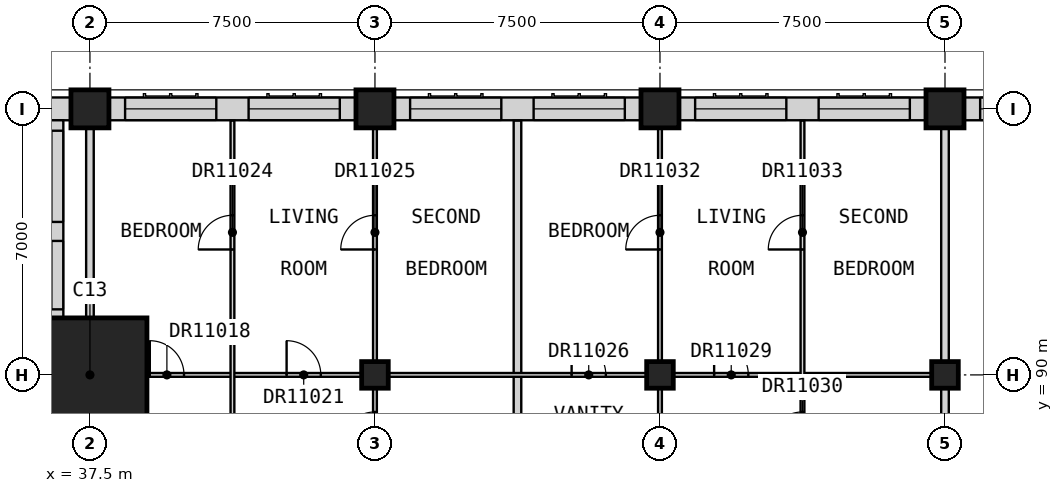
"""IFC4 building model, lengths in metres.
Left out: names, types, materials, properties, quantities, classifications, styles, units other than length and angle.
Written with IfcOpenShell. Run it as: python <this file> out.ifc"""

import sys

from ifc_helpers import new_model, si_unit, direction, frame, frame_2d, origin, origin_2d, place, context, subcontext, project, spatial, rectangle, extrude, element, fill, save


model = new_model("IFC4")
c1 = context("Model", 3, precision=1e-05, world=origin(), true_north=direction((0.0, 1.0)))
c2 = subcontext(c1, "Body", "Model", "MODEL_VIEW")
j1 = project(units=[si_unit("LENGTHUNIT", "METRE"), si_unit("PLANEANGLEUNIT", "RADIAN")], contexts=[c1])
p1 = place(None, origin())
s1 = spatial("IfcSite", under=j1, at=p1, CompositionType="ELEMENT")
p2 = place(p1, origin())
s2 = spatial("IfcBuilding", under=s1, at=p2, CompositionType="ELEMENT")
p3 = place(p2, frame((0.0, 0.0, 276.7)))
s3 = spatial("IfcBuildingStorey", under=s2, at=p3, CompositionType="ELEMENT", Elevation=276.7)
p4 = place(p3, frame((37.5, 97.0, 0.0), z_axis=(0.0, 0.0, 1.0), x_axis=(1.0, 0.0, 0.0)))
e1 = element("IfcColumn", 1, at=p4, inside=s3, PredefinedType="COLUMN", context=c2, shape_type="SweptSolid", body=[
    extrude(rectangle(XDim=1.0, YDim=1.0, at=origin_2d()), origin(), (0.0, 0.0, 1.0), 3.5),
])
p5 = place(p3, frame((45.0, 90.0, 0.0), z_axis=(0.0, 0.0, 1.0), x_axis=(1.0, 0.0, 0.0)))
e2 = element("IfcColumn", 2, at=p5, inside=s3, PredefinedType="COLUMN", context=c2, shape_type="SweptSolid", body=[
    extrude(rectangle(XDim=0.7, YDim=0.7, at=origin_2d()), origin(), (0.0, 0.0, 1.0), 3.5),
])
p6 = place(p3, frame((45.0, 97.0, 0.0), z_axis=(0.0, 0.0, 1.0), x_axis=(1.0, 0.0, 0.0)))
e3 = element("IfcColumn", 3, at=p6, inside=s3, PredefinedType="COLUMN", context=c2, shape_type="SweptSolid", body=[
    extrude(rectangle(XDim=1.0, YDim=1.0, at=origin_2d()), origin(), (0.0, 0.0, 1.0), 3.5),
])
p7 = place(p3, frame((52.5, 90.0, 0.0), z_axis=(0.0, 0.0, 1.0), x_axis=(1.0, 0.0, 0.0)))
e4 = element("IfcColumn", 4, at=p7, inside=s3, PredefinedType="COLUMN", context=c2, shape_type="SweptSolid", body=[
    extrude(rectangle(XDim=0.7, YDim=0.7, at=origin_2d()), origin(), (0.0, 0.0, 1.0), 3.5),
])
p8 = place(p3, frame((52.5, 97.0, 0.0), z_axis=(0.0, 0.0, 1.0), x_axis=(1.0, 0.0, 0.0)))
e5 = element("IfcColumn", 5, at=p8, inside=s3, PredefinedType="COLUMN", context=c2, shape_type="SweptSolid", body=[
    extrude(rectangle(XDim=1.0, YDim=1.0, at=origin_2d()), origin(), (0.0, 0.0, 1.0), 3.5),
])
p9 = place(p3, frame((60.0, 90.0, 0.0), z_axis=(0.0, 0.0, 1.0), x_axis=(1.0, 0.0, 0.0)))
e6 = element("IfcColumn", 6, at=p9, inside=s3, PredefinedType="COLUMN", context=c2, shape_type="SweptSolid", body=[
    extrude(rectangle(XDim=0.7, YDim=0.7, at=origin_2d()), origin(), (0.0, 0.0, 1.0), 3.5),
])
p10 = place(p3, frame((60.0, 97.0, 0.0), z_axis=(0.0, 0.0, 1.0), x_axis=(1.0, 0.0, 0.0)))
e7 = element("IfcColumn", 7, at=p10, inside=s3, PredefinedType="COLUMN", context=c2, shape_type="SweptSolid", body=[
    extrude(rectangle(XDim=1.0, YDim=1.0, at=origin_2d()), origin(), (0.0, 0.0, 1.0), 3.5),
])
p11 = place(p3, frame((37.5, 90.0, 0.0), z_axis=(0.0, 0.0, 1.0), x_axis=(1.0, 0.0, 0.0)))
e8 = element("IfcColumn", 8, at=p11, inside=s3, PredefinedType="COLUMN", context=c2, shape_type="SweptSolid", body=[
    extrude(rectangle(XDim=3.0, YDim=3.0, at=origin_2d()), origin(), (0.0, 0.0, 1.0), 3.5),
])
p12 = place(p3, frame((67.0, 97.0, 0.0), z_axis=(0.0, 0.0, 1.0), x_axis=(-1.0, 0.0, 0.0)))
e9 = element("IfcWall", 9, at=p12, inside=s3, PredefinedType="SOLIDWALL", context=c2, shape_type="SweptSolid", body=[
    extrude(rectangle(XDim=6.5, YDim=0.6, at=frame_2d((3.25, 0.0))), origin(), (0.0, 0.0, 1.0), 2.75),
])
p13 = place(p12, frame((3.675, 0.0, 0.8)))
e10 = element("IfcOpeningElement", 10, at=p13, cuts=e9, PredefinedType="OPENING", context=c2, shape_type="SweptSolid", body=[
    extrude(rectangle(XDim=2.4, YDim=1.8, at=frame_2d((1.2, 0.9))), frame((0.0, 0.31, 0.0), z_axis=(0.0, -1.0, 0.0), x_axis=(1.0, 0.0, 0.0)), (0.0, 0.0, 1.0), 0.62),
])
p14 = place(p12, frame((0.425, 0.0, 0.8)))
e11 = element("IfcOpeningElement", 11, at=p14, cuts=e9, PredefinedType="OPENING", context=c2, shape_type="SweptSolid", body=[
    extrude(rectangle(XDim=2.4, YDim=1.8, at=frame_2d((1.2, 0.9))), frame((0.0, 0.31, 0.0), z_axis=(0.0, -1.0, 0.0), x_axis=(1.0, 0.0, 0.0)), (0.0, 0.0, 1.0), 0.62),
])
p15 = place(p3, frame((59.5, 97.0, 0.0), z_axis=(0.0, 0.0, 1.0), x_axis=(-1.0, 0.0, 0.0)))
e12 = element("IfcWall", 12, at=p15, inside=s3, PredefinedType="SOLIDWALL", context=c2, shape_type="SweptSolid", body=[
    extrude(rectangle(XDim=6.5, YDim=0.6, at=frame_2d((3.25, 0.0))), origin(), (0.0, 0.0, 1.0), 2.75),
])
p16 = place(p15, frame((3.675, 0.0, 0.8)))
e13 = element("IfcOpeningElement", 13, at=p16, cuts=e12, PredefinedType="OPENING", context=c2, shape_type="SweptSolid", body=[
    extrude(rectangle(XDim=2.4, YDim=1.8, at=frame_2d((1.2, 0.9))), frame((0.0, 0.31, 0.0), z_axis=(0.0, -1.0, 0.0), x_axis=(1.0, 0.0, 0.0)), (0.0, 0.0, 1.0), 0.62),
])
p17 = place(p15, frame((0.425, 0.0, 0.8)))
e14 = element("IfcOpeningElement", 14, at=p17, cuts=e12, PredefinedType="OPENING", context=c2, shape_type="SweptSolid", body=[
    extrude(rectangle(XDim=2.4, YDim=1.8, at=frame_2d((1.2, 0.9))), frame((0.0, 0.31, 0.0), z_axis=(0.0, -1.0, 0.0), x_axis=(1.0, 0.0, 0.0)), (0.0, 0.0, 1.0), 0.62),
])
p18 = place(p3, frame((52.0, 97.0, 0.0), z_axis=(0.0, 0.0, 1.0), x_axis=(-1.0, 0.0, 0.0)))
e15 = element("IfcWall", 15, at=p18, inside=s3, PredefinedType="SOLIDWALL", context=c2, shape_type="SweptSolid", body=[
    extrude(rectangle(XDim=6.5, YDim=0.6, at=frame_2d((3.25, 0.0))), origin(), (0.0, 0.0, 1.0), 2.75),
])
p19 = place(p18, frame((3.675, 0.0, 0.8)))
e16 = element("IfcOpeningElement", 16, at=p19, cuts=e15, PredefinedType="OPENING", context=c2, shape_type="SweptSolid", body=[
    extrude(rectangle(XDim=2.4, YDim=1.8, at=frame_2d((1.2, 0.9))), frame((0.0, 0.31, 0.0), z_axis=(0.0, -1.0, 0.0), x_axis=(1.0, 0.0, 0.0)), (0.0, 0.0, 1.0), 0.62),
])
p20 = place(p18, frame((0.425, 0.0, 0.8)))
e17 = element("IfcOpeningElement", 17, at=p20, cuts=e15, PredefinedType="OPENING", context=c2, shape_type="SweptSolid", body=[
    extrude(rectangle(XDim=2.4, YDim=1.8, at=frame_2d((1.2, 0.9))), frame((0.0, 0.31, 0.0), z_axis=(0.0, -1.0, 0.0), x_axis=(1.0, 0.0, 0.0)), (0.0, 0.0, 1.0), 0.62),
])
p21 = place(p3, frame((44.5, 97.0, 0.0), z_axis=(0.0, 0.0, 1.0), x_axis=(-1.0, 0.0, 0.0)))
e18 = element("IfcWall", 18, at=p21, inside=s3, PredefinedType="SOLIDWALL", context=c2, shape_type="SweptSolid", body=[
    extrude(rectangle(XDim=6.5, YDim=0.6, at=frame_2d((3.25, 0.0))), origin(), (0.0, 0.0, 1.0), 2.75),
])
p22 = place(p21, frame((3.675, 0.0, 0.8)))
e19 = element("IfcOpeningElement", 19, at=p22, cuts=e18, PredefinedType="OPENING", context=c2, shape_type="SweptSolid", body=[
    extrude(rectangle(XDim=2.4, YDim=1.8, at=frame_2d((1.2, 0.9))), frame((0.0, 0.31, 0.0), z_axis=(0.0, -1.0, 0.0), x_axis=(1.0, 0.0, 0.0)), (0.0, 0.0, 1.0), 0.62),
])
p23 = place(p21, frame((0.425, 0.0, 0.8)))
e20 = element("IfcOpeningElement", 20, at=p23, cuts=e18, PredefinedType="OPENING", context=c2, shape_type="SweptSolid", body=[
    extrude(rectangle(XDim=2.4, YDim=1.8, at=frame_2d((1.2, 0.9))), frame((0.0, 0.31, 0.0), z_axis=(0.0, -1.0, 0.0), x_axis=(1.0, 0.0, 0.0)), (0.0, 0.0, 1.0), 0.62),
])
p24 = place(p3, frame((37.0, 97.0, 0.0), z_axis=(0.0, 0.0, 1.0), x_axis=(-1.0, 0.0, 0.0)))
e21 = element("IfcWall", 21, at=p24, inside=s3, PredefinedType="SOLIDWALL", context=c2, shape_type="SweptSolid", body=[
    extrude(rectangle(XDim=1.0, YDim=0.6, at=frame_2d((0.5, 0.0))), origin(), (0.0, 0.0, 1.0), 3.25),
])
p25 = place(p3, frame((36.5, 96.7, 0.0), z_axis=(0.0, 0.0, 1.0), x_axis=(0.0, -1.0, 0.0)))
e22 = element("IfcWall", 22, at=p25, inside=s3, PredefinedType="SOLIDWALL", context=c2, shape_type="SweptSolid", body=[
    extrude(rectangle(XDim=5.2, YDim=0.6, at=frame_2d((2.6, 0.0))), origin(), (0.0, 0.0, 1.0), 3.25),
])
p26 = place(p25, frame((3.175, 0.0, 0.8)))
e23 = element("IfcOpeningElement", 23, at=p26, cuts=e22, PredefinedType="OPENING", context=c2, shape_type="SweptSolid", body=[
    extrude(rectangle(XDim=1.8, YDim=1.8, at=frame_2d((0.9, 0.9))), frame((0.0, 0.31, 0.0), z_axis=(0.0, -1.0, 0.0), x_axis=(1.0, 0.0, 0.0)), (0.0, 0.0, 1.0), 0.62),
])
p27 = place(p25, frame((0.275, 0.0, 0.8)))
e24 = element("IfcOpeningElement", 24, at=p27, cuts=e22, PredefinedType="OPENING", context=c2, shape_type="SweptSolid", body=[
    extrude(rectangle(XDim=2.4, YDim=1.8, at=frame_2d((1.2, 0.9))), frame((0.0, 0.31, 0.0), z_axis=(0.0, -1.0, 0.0), x_axis=(1.0, 0.0, 0.0)), (0.0, 0.0, 1.0), 0.62),
])
p28 = place(p3, frame((37.5, 84.375, 0.0), z_axis=(0.0, 0.0, 1.0), x_axis=(0.0, 1.0, 0.0)))
e25 = element("IfcWall", 25, at=p28, inside=s3, PredefinedType="PARTITIONING", context=c2, shape_type="SweptSolid", body=[
    extrude(rectangle(XDim=13.125, YDim=0.2, at=frame_2d((6.562, 0.0))), origin(), (0.0, 0.0, 1.0), 2.75),
])
p29 = place(p3, frame((48.75, 84.375, 0.0), z_axis=(0.0, 0.0, 1.0), x_axis=(0.0, 1.0, 0.0)))
e26 = element("IfcWall", 26, at=p29, inside=s3, PredefinedType="PARTITIONING", context=c2, shape_type="SweptSolid", body=[
    extrude(rectangle(XDim=12.315, YDim=0.2, at=frame_2d((6.157, 0.0))), origin(), (0.0, 0.0, 1.0), 3.25),
])
p30 = place(p3, frame((60.0, 84.375, 0.0), z_axis=(0.0, 0.0, 1.0), x_axis=(0.0, 1.0, 0.0)))
e27 = element("IfcWall", 27, at=p30, inside=s3, PredefinedType="PARTITIONING", context=c2, shape_type="SweptSolid", body=[
    extrude(rectangle(XDim=13.125, YDim=0.2, at=frame_2d((6.562, 0.0))), origin(), (0.0, 0.0, 1.0), 3.25),
])
p31 = place(p3, frame((37.6, 90.0, 0.0), z_axis=(0.0, 0.0, 1.0), x_axis=(1.0, 0.0, 0.0)))
e28 = element("IfcWall", 28, at=p31, inside=s3, PredefinedType="PARTITIONING", context=c2, shape_type="SweptSolid", body=[
    extrude(rectangle(XDim=22.3, YDim=0.1, at=frame_2d((11.15, 0.0))), origin(), (0.0, 0.0, 1.0), 3.25),
])
p32 = place(p31, frame((1.475, 0.0, 0.0)))
e29 = element("IfcOpeningElement", 29, at=p32, cuts=e28, PredefinedType="OPENING", context=c2, shape_type="SweptSolid", body=[
    extrude(rectangle(XDim=0.9, YDim=2.1, at=frame_2d((0.45, 1.05))), frame((0.0, 0.06, 0.0), z_axis=(0.0, -1.0, 0.0), x_axis=(1.0, 0.0, 0.0)), (0.0, 0.0, 1.0), 0.12),
])
p33 = place(p31, frame((5.075, 0.0, 0.0)))
e30 = element("IfcOpeningElement", 30, at=p33, cuts=e28, PredefinedType="OPENING", context=c2, shape_type="SweptSolid", body=[
    extrude(rectangle(XDim=0.9, YDim=2.1, at=frame_2d((0.45, 1.05))), frame((0.0, 0.06, 0.0), z_axis=(0.0, -1.0, 0.0), x_axis=(1.0, 0.0, 0.0)), (0.0, 0.0, 1.0), 0.12),
])
p34 = place(p31, frame((12.575, 0.0, 0.0)))
e31 = element("IfcOpeningElement", 31, at=p34, cuts=e28, PredefinedType="OPENING", context=c2, shape_type="SweptSolid", body=[
    extrude(rectangle(XDim=0.9, YDim=2.1, at=frame_2d((0.45, 1.05))), frame((0.0, 0.06, 0.0), z_axis=(0.0, -1.0, 0.0), x_axis=(1.0, 0.0, 0.0)), (0.0, 0.0, 1.0), 0.12),
])
p35 = place(p31, frame((16.325, 0.0, 0.0)))
e32 = element("IfcOpeningElement", 32, at=p35, cuts=e28, PredefinedType="OPENING", context=c2, shape_type="SweptSolid", body=[
    extrude(rectangle(XDim=0.9, YDim=2.1, at=frame_2d((0.45, 1.05))), frame((0.0, 0.06, 0.0), z_axis=(0.0, -1.0, 0.0), x_axis=(1.0, 0.0, 0.0)), (0.0, 0.0, 1.0), 0.12),
])
p36 = place(p3, frame((41.25, 87.212, 0.0), z_axis=(0.0, 0.0, 1.0), x_axis=(0.0, 1.0, 0.0)))
e33 = element("IfcWall", 33, at=p36, inside=s3, PredefinedType="PARTITIONING", context=c2, shape_type="SweptSolid", body=[
    extrude(rectangle(XDim=9.478, YDim=0.1, at=frame_2d((4.739, 0.0))), origin(), (0.0, 0.0, 1.0), 3.25),
])
p37 = place(p36, frame((6.087, 0.0, 0.0)))
e34 = element("IfcOpeningElement", 34, at=p37, cuts=e33, PredefinedType="OPENING", context=c2, shape_type="SweptSolid", body=[
    extrude(rectangle(XDim=0.9, YDim=2.1, at=frame_2d((0.45, 1.05))), frame((0.0, 0.06, 0.0), z_axis=(0.0, -1.0, 0.0), x_axis=(1.0, 0.0, 0.0)), (0.0, 0.0, 1.0), 0.12),
])
p38 = place(p3, frame((45.0, 87.212, 0.0), z_axis=(0.0, 0.0, 1.0), x_axis=(0.0, 1.0, 0.0)))
e35 = element("IfcWall", 35, at=p38, inside=s3, PredefinedType="PARTITIONING", context=c2, shape_type="SweptSolid", body=[
    extrude(rectangle(XDim=10.288, YDim=0.1, at=frame_2d((5.144, 0.0))), origin(), (0.0, 0.0, 1.0), 3.25),
])
p39 = place(p38, frame((0.913, 0.0, 0.0)))
e36 = element("IfcOpeningElement", 36, at=p39, cuts=e35, PredefinedType="OPENING", context=c2, shape_type="SweptSolid", body=[
    extrude(rectangle(XDim=0.9, YDim=2.1, at=frame_2d((0.45, 1.05))), frame((0.0, 0.06, 0.0), z_axis=(0.0, -1.0, 0.0), x_axis=(1.0, 0.0, 0.0)), (0.0, 0.0, 1.0), 0.12),
])
p40 = place(p38, frame((6.087, 0.0, 0.0)))
e37 = element("IfcOpeningElement", 37, at=p40, cuts=e35, PredefinedType="OPENING", context=c2, shape_type="SweptSolid", body=[
    extrude(rectangle(XDim=0.9, YDim=2.1, at=frame_2d((0.45, 1.05))), frame((0.0, 0.06, 0.0), z_axis=(0.0, -1.0, 0.0), x_axis=(1.0, 0.0, 0.0)), (0.0, 0.0, 1.0), 0.12),
])
p41 = place(p3, frame((52.5, 87.212, 0.0), z_axis=(0.0, 0.0, 1.0), x_axis=(0.0, 1.0, 0.0)))
e38 = element("IfcWall", 38, at=p41, inside=s3, PredefinedType="PARTITIONING", context=c2, shape_type="SweptSolid", body=[
    extrude(rectangle(XDim=10.288, YDim=0.1, at=frame_2d((5.144, 0.0))), origin(), (0.0, 0.0, 1.0), 3.25),
])
p42 = place(p41, frame((6.087, 0.0, 0.0)))
e39 = element("IfcOpeningElement", 39, at=p42, cuts=e38, PredefinedType="OPENING", context=c2, shape_type="SweptSolid", body=[
    extrude(rectangle(XDim=0.9, YDim=2.1, at=frame_2d((0.45, 1.05))), frame((0.0, 0.06, 0.0), z_axis=(0.0, -1.0, 0.0), x_axis=(1.0, 0.0, 0.0)), (0.0, 0.0, 1.0), 0.12),
])
p43 = place(p3, frame((56.25, 87.212, 0.0), z_axis=(0.0, 0.0, 1.0), x_axis=(0.0, 1.0, 0.0)))
e40 = element("IfcWall", 40, at=p43, inside=s3, PredefinedType="PARTITIONING", context=c2, shape_type="SweptSolid", body=[
    extrude(rectangle(XDim=9.478, YDim=0.1, at=frame_2d((4.739, 0.0))), origin(), (0.0, 0.0, 1.0), 3.25),
])
p44 = place(p43, frame((0.913, 0.0, 0.0)))
e41 = element("IfcOpeningElement", 41, at=p44, cuts=e40, PredefinedType="OPENING", context=c2, shape_type="SweptSolid", body=[
    extrude(rectangle(XDim=0.9, YDim=2.1, at=frame_2d((0.45, 1.05))), frame((0.0, 0.06, 0.0), z_axis=(0.0, -1.0, 0.0), x_axis=(1.0, 0.0, 0.0)), (0.0, 0.0, 1.0), 0.12),
])
p45 = place(p43, frame((6.087, 0.0, 0.0)))
e42 = element("IfcOpeningElement", 42, at=p45, cuts=e40, PredefinedType="OPENING", context=c2, shape_type="SweptSolid", body=[
    extrude(rectangle(XDim=0.9, YDim=2.1, at=frame_2d((0.45, 1.05))), frame((0.0, 0.06, 0.0), z_axis=(0.0, -1.0, 0.0), x_axis=(1.0, 0.0, 0.0)), (0.0, 0.0, 1.0), 0.12),
])
p46 = place(p13, origin())
e43 = element("IfcWindow", 43, at=p46, inside=s3, PartitioningType="SINGLE_PANEL", PredefinedType="WINDOW", context=c2, shape_type="SweptSolid", body=[
    extrude(rectangle(XDim=2.4, YDim=1.8, at=frame_2d((1.2, 0.9))), frame((0.0, -0.07, 0.0), z_axis=(0.0, -1.0, 0.0), x_axis=(1.0, 0.0, 0.0)), (0.0, 0.0, 1.0), 0.06),
])
fill(e10, e43)
p47 = place(p16, origin())
e44 = element("IfcWindow", 44, at=p47, inside=s3, PartitioningType="SINGLE_PANEL", PredefinedType="WINDOW", context=c2, shape_type="SweptSolid", body=[
    extrude(rectangle(XDim=2.4, YDim=1.8, at=frame_2d((1.2, 0.9))), frame((0.0, -0.07, 0.0), z_axis=(0.0, -1.0, 0.0), x_axis=(1.0, 0.0, 0.0)), (0.0, 0.0, 1.0), 0.06),
])
fill(e13, e44)
p48 = place(p17, origin())
e45 = element("IfcWindow", 45, at=p48, inside=s3, PartitioningType="SINGLE_PANEL", PredefinedType="WINDOW", context=c2, shape_type="SweptSolid", body=[
    extrude(rectangle(XDim=2.4, YDim=1.8, at=frame_2d((1.2, 0.9))), frame((0.0, -0.07, 0.0), z_axis=(0.0, -1.0, 0.0), x_axis=(1.0, 0.0, 0.0)), (0.0, 0.0, 1.0), 0.06),
])
fill(e14, e45)
p49 = place(p19, origin())
e46 = element("IfcWindow", 46, at=p49, inside=s3, PartitioningType="SINGLE_PANEL", PredefinedType="WINDOW", context=c2, shape_type="SweptSolid", body=[
    extrude(rectangle(XDim=2.4, YDim=1.8, at=frame_2d((1.2, 0.9))), frame((0.0, -0.07, 0.0), z_axis=(0.0, -1.0, 0.0), x_axis=(1.0, 0.0, 0.0)), (0.0, 0.0, 1.0), 0.06),
])
fill(e16, e46)
p50 = place(p20, origin())
e47 = element("IfcWindow", 47, at=p50, inside=s3, PartitioningType="SINGLE_PANEL", PredefinedType="WINDOW", context=c2, shape_type="SweptSolid", body=[
    extrude(rectangle(XDim=2.4, YDim=1.8, at=frame_2d((1.2, 0.9))), frame((0.0, -0.07, 0.0), z_axis=(0.0, -1.0, 0.0), x_axis=(1.0, 0.0, 0.0)), (0.0, 0.0, 1.0), 0.06),
])
fill(e17, e47)
p51 = place(p22, origin())
e48 = element("IfcWindow", 48, at=p51, inside=s3, PartitioningType="SINGLE_PANEL", PredefinedType="WINDOW", context=c2, shape_type="SweptSolid", body=[
    extrude(rectangle(XDim=2.4, YDim=1.8, at=frame_2d((1.2, 0.9))), frame((0.0, -0.07, 0.0), z_axis=(0.0, -1.0, 0.0), x_axis=(1.0, 0.0, 0.0)), (0.0, 0.0, 1.0), 0.06),
])
fill(e19, e48)
p52 = place(p23, origin())
e49 = element("IfcWindow", 49, at=p52, inside=s3, PartitioningType="SINGLE_PANEL", PredefinedType="WINDOW", context=c2, shape_type="SweptSolid", body=[
    extrude(rectangle(XDim=2.4, YDim=1.8, at=frame_2d((1.2, 0.9))), frame((0.0, -0.07, 0.0), z_axis=(0.0, -1.0, 0.0), x_axis=(1.0, 0.0, 0.0)), (0.0, 0.0, 1.0), 0.06),
])
fill(e20, e49)
p53 = place(p32, origin())
e50 = element("IfcDoor", 50, at=p53, inside=s3, OperationType="SINGLE_SWING_LEFT", PredefinedType="DOOR", context=c2, shape_type="SweptSolid", body=[
    extrude(rectangle(XDim=0.9, YDim=2.1, at=frame_2d((0.45, 1.05))), frame((0.0, 0.025, 0.0), z_axis=(0.0, -1.0, 0.0), x_axis=(1.0, 0.0, 0.0)), (0.0, 0.0, 1.0), 0.05),
])
fill(e29, e50)
p54 = place(p33, origin())
e51 = element("IfcDoor", 51, at=p54, inside=s3, OperationType="SINGLE_SWING_RIGHT", PredefinedType="DOOR", context=c2, shape_type="SweptSolid", body=[
    extrude(rectangle(XDim=0.9, YDim=2.1, at=frame_2d((0.45, 1.05))), frame((0.0, 0.025, 0.0), z_axis=(0.0, -1.0, 0.0), x_axis=(1.0, 0.0, 0.0)), (0.0, 0.0, 1.0), 0.05),
])
fill(e30, e51)
p55 = place(p39, origin())
e52 = element("IfcDoor", 52, at=p55, inside=s3, OperationType="SINGLE_SWING_LEFT", PredefinedType="DOOR", context=c2, shape_type="SweptSolid", body=[
    extrude(rectangle(XDim=0.9, YDim=2.1, at=frame_2d((0.45, 1.05))), frame((0.0, 0.025, 0.0), z_axis=(0.0, -1.0, 0.0), x_axis=(1.0, 0.0, 0.0)), (0.0, 0.0, 1.0), 0.05),
])
fill(e36, e52)
p56 = place(p37, origin())
e53 = element("IfcDoor", 53, at=p56, inside=s3, OperationType="SINGLE_SWING_LEFT", PredefinedType="DOOR", context=c2, shape_type="SweptSolid", body=[
    extrude(rectangle(XDim=0.9, YDim=2.1, at=frame_2d((0.45, 1.05))), frame((0.0, 0.025, 0.0), z_axis=(0.0, -1.0, 0.0), x_axis=(1.0, 0.0, 0.0)), (0.0, 0.0, 1.0), 0.05),
])
fill(e34, e53)
p57 = place(p40, origin())
e54 = element("IfcDoor", 54, at=p57, inside=s3, OperationType="SINGLE_SWING_LEFT", PredefinedType="DOOR", context=c2, shape_type="SweptSolid", body=[
    extrude(rectangle(XDim=0.9, YDim=2.1, at=frame_2d((0.45, 1.05))), frame((0.0, 0.025, 0.0), z_axis=(0.0, -1.0, 0.0), x_axis=(1.0, 0.0, 0.0)), (0.0, 0.0, 1.0), 0.05),
])
fill(e37, e54)
p58 = place(p34, origin())
e55 = element("IfcDoor", 55, at=p58, inside=s3, OperationType="SINGLE_SWING_RIGHT", PredefinedType="DOOR", context=c2, shape_type="SweptSolid", body=[
    extrude(rectangle(XDim=0.9, YDim=2.1, at=frame_2d((0.45, 1.05))), frame((0.0, 0.025, 0.0), z_axis=(0.0, -1.0, 0.0), x_axis=(1.0, 0.0, 0.0)), (0.0, 0.0, 1.0), 0.05),
])
fill(e31, e55)
p59 = place(p35, origin())
e56 = element("IfcDoor", 56, at=p59, inside=s3, OperationType="SINGLE_SWING_RIGHT", PredefinedType="DOOR", context=c2, shape_type="SweptSolid", body=[
    extrude(rectangle(XDim=0.9, YDim=2.1, at=frame_2d((0.45, 1.05))), frame((0.0, 0.025, 0.0), z_axis=(0.0, -1.0, 0.0), x_axis=(1.0, 0.0, 0.0)), (0.0, 0.0, 1.0), 0.05),
])
fill(e32, e56)
p60 = place(p44, origin())
e57 = element("IfcDoor", 57, at=p60, inside=s3, OperationType="SINGLE_SWING_LEFT", PredefinedType="DOOR", context=c2, shape_type="SweptSolid", body=[
    extrude(rectangle(XDim=0.9, YDim=2.1, at=frame_2d((0.45, 1.05))), frame((0.0, 0.025, 0.0), z_axis=(0.0, -1.0, 0.0), x_axis=(1.0, 0.0, 0.0)), (0.0, 0.0, 1.0), 0.05),
])
fill(e41, e57)
p61 = place(p42, origin())
e58 = element("IfcDoor", 58, at=p61, inside=s3, OperationType="SINGLE_SWING_LEFT", PredefinedType="DOOR", context=c2, shape_type="SweptSolid", body=[
    extrude(rectangle(XDim=0.9, YDim=2.1, at=frame_2d((0.45, 1.05))), frame((0.0, 0.025, 0.0), z_axis=(0.0, -1.0, 0.0), x_axis=(1.0, 0.0, 0.0)), (0.0, 0.0, 1.0), 0.05),
])
fill(e39, e58)
p62 = place(p45, origin())
e59 = element("IfcDoor", 59, at=p62, inside=s3, OperationType="SINGLE_SWING_LEFT", PredefinedType="DOOR", context=c2, shape_type="SweptSolid", body=[
    extrude(rectangle(XDim=0.9, YDim=2.1, at=frame_2d((0.45, 1.05))), frame((0.0, 0.025, 0.0), z_axis=(0.0, -1.0, 0.0), x_axis=(1.0, 0.0, 0.0)), (0.0, 0.0, 1.0), 0.05),
])
fill(e42, e59)
save(model, sys.argv[1])
